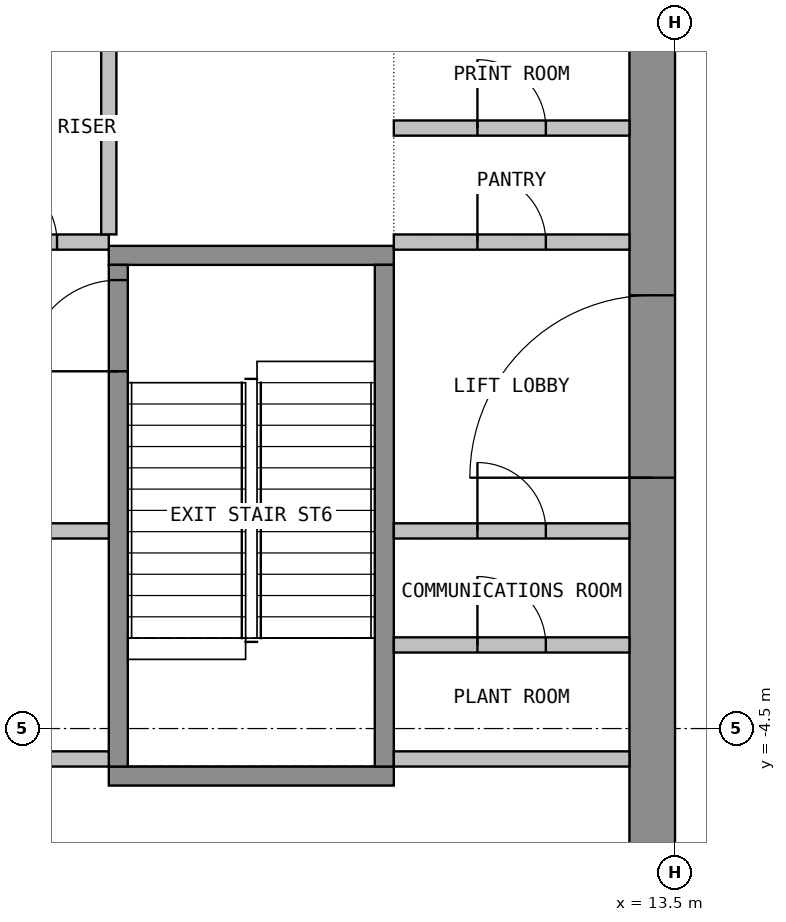
"""IFC4 building model, lengths in metres.
Left out: names, types, materials, properties, quantities, classifications, styles, units other than length and angle.
Written with IfcOpenShell. Run it as: python <this file> out.ifc"""

import sys

from ifc_helpers import new_model, si_unit, direction, frame, frame_2d, origin, place, context, subcontext, project, spatial, rectangle, extrude, element, fill, save


model = new_model("IFC4")
c1 = context("Model", 3, precision=1e-05, world=origin(), true_north=direction((0.0, 1.0)))
c2 = subcontext(c1, "Body", "Model", "MODEL_VIEW")
j1 = project(units=[si_unit("LENGTHUNIT", "METRE"), si_unit("PLANEANGLEUNIT", "RADIAN")], contexts=[c1])
p1 = place(None, origin())
s1 = spatial("IfcSite", under=j1, at=p1, CompositionType="ELEMENT")
p2 = place(p1, origin())
s2 = spatial("IfcBuilding", under=s1, at=p2, CompositionType="ELEMENT")
p3 = place(p2, frame((0.0, 0.0, 318.9)))
s3 = spatial("IfcBuildingStorey", under=s2, at=p3, CompositionType="ELEMENT", Elevation=318.9)
p4 = place(p3, frame((13.2, -10.65, 0.0), z_axis=(0.0, 0.0, 1.0), x_axis=(0.0, 1.0, 0.0)))
e1 = element("IfcWall", 1, at=p4, inside=s3, PredefinedType="SHEAR", context=c2, shape_type="SweptSolid", body=[
    extrude(rectangle(XDim=21.3, YDim=0.6, at=frame_2d((10.65, 0.0))), origin(), (0.0, 0.0, 1.0), 3.6),
])
p5 = place(p4, frame((9.45, 0.0, 0.0)))
e2 = element("IfcOpeningElement", 2, at=p5, cuts=e1, PredefinedType="OPENING", context=c2, shape_type="SweptSolid", body=[
    extrude(rectangle(XDim=2.4, YDim=2.1, at=frame_2d((1.2, 1.05))), frame((0.0, 0.31, 0.0), z_axis=(0.0, -1.0, 0.0), x_axis=(1.0, 0.0, 0.0)), (0.0, 0.0, 1.0), 0.62),
])
for number, where, z_axis, x_axis in (
    (3, (6.05, -5.125, 0.0), (0.0, 0.0, 1.0), (1.0, 0.0, 0.0)),
    (4, (6.05, 1.725, 0.0), (0.0, 0.0, 1.0), (1.0, 0.0, 0.0)),
):
    element("IfcWall", number, at=place(p3, frame(where, z_axis=z_axis, x_axis=x_axis)), inside=s3, PredefinedType="SHEAR", context=c2, shape_type="SweptSolid", body=[
        extrude(rectangle(XDim=3.75, YDim=0.25, at=frame_2d((1.875, 0.0))), origin(), (0.0, 0.0, 1.0), 3.6),
    ])
p6 = place(p3, frame((6.175, -5.0, 0.0), z_axis=(0.0, 0.0, 1.0), x_axis=(0.0, 1.0, 0.0)))
e5 = element("IfcWall", 5, at=p6, inside=s3, PredefinedType="SHEAR", context=c2, shape_type="SweptSolid", body=[
    extrude(rectangle(XDim=6.6, YDim=0.25, at=frame_2d((3.3, 0.0))), origin(), (0.0, 0.0, 1.0), 3.6),
])
p7 = place(p6, frame((5.2, 0.0, 0.0)))
e6 = element("IfcOpeningElement", 6, at=p7, cuts=e5, PredefinedType="OPENING", context=c2, shape_type="SweptSolid", body=[
    extrude(rectangle(XDim=1.2, YDim=2.1, at=frame_2d((0.6, 1.05))), frame((0.0, 0.135, 0.0), z_axis=(0.0, -1.0, 0.0), x_axis=(1.0, 0.0, 0.0)), (0.0, 0.0, 1.0), 0.27),
])
p8 = place(p3, frame((9.675, -5.0, 0.0), z_axis=(0.0, 0.0, 1.0), x_axis=(0.0, 1.0, 0.0)))
e7 = element("IfcWall", 7, at=p8, inside=s3, PredefinedType="SHEAR", context=c2, shape_type="SweptSolid", body=[
    extrude(rectangle(XDim=6.6, YDim=0.25, at=frame_2d((3.3, 0.0))), origin(), (0.0, 0.0, 1.0), 3.6),
])
p9 = place(p3, frame((1.525, 1.9, 0.0), z_axis=(0.0, 0.0, 1.0), x_axis=(1.0, 0.0, 0.0)))
e8 = element("IfcWall", 8, at=p9, inside=s3, PredefinedType="PARTITIONING", context=c2, shape_type="SweptSolid", body=[
    extrude(rectangle(XDim=4.525, YDim=0.2, at=frame_2d((2.263, 0.0))), origin(), (0.0, 0.0, 1.0), 3.6),
])
p10 = place(p9, frame((0.681, 0.0, 0.0)))
e9 = element("IfcOpeningElement", 9, at=p10, cuts=e8, PredefinedType="OPENING", context=c2, shape_type="SweptSolid", body=[
    extrude(rectangle(XDim=0.9, YDim=2.1, at=frame_2d((0.45, 1.05))), frame((0.0, 0.11, 0.0), z_axis=(0.0, -1.0, 0.0), x_axis=(1.0, 0.0, 0.0)), (0.0, 0.0, 1.0), 0.22),
])
p11 = place(p9, frame((2.944, 0.0, 0.0)))
e10 = element("IfcOpeningElement", 10, at=p11, cuts=e8, PredefinedType="OPENING", context=c2, shape_type="SweptSolid", body=[
    extrude(rectangle(XDim=0.9, YDim=2.1, at=frame_2d((0.45, 1.05))), frame((0.0, 0.11, 0.0), z_axis=(0.0, -1.0, 0.0), x_axis=(1.0, 0.0, 0.0)), (0.0, 0.0, 1.0), 0.22),
])
p12 = place(p3, frame((9.8, 3.4, 0.0), z_axis=(0.0, 0.0, 1.0), x_axis=(1.0, 0.0, 0.0)))
e11 = element("IfcWall", 11, at=p12, inside=s3, PredefinedType="PARTITIONING", context=c2, shape_type="SweptSolid", body=[
    extrude(rectangle(XDim=3.1, YDim=0.2, at=frame_2d((1.55, 0.0))), origin(), (0.0, 0.0, 1.0), 3.6),
])
p13 = place(p12, frame((1.1, 0.0, 0.0)))
e12 = element("IfcOpeningElement", 12, at=p13, cuts=e11, PredefinedType="OPENING", context=c2, shape_type="SweptSolid", body=[
    extrude(rectangle(XDim=0.9, YDim=2.1, at=frame_2d((0.45, 1.05))), frame((0.0, 0.11, 0.0), z_axis=(0.0, -1.0, 0.0), x_axis=(1.0, 0.0, 0.0)), (0.0, 0.0, 1.0), 0.22),
])
p14 = place(p3, frame((9.8, 1.9, 0.0), z_axis=(0.0, 0.0, 1.0), x_axis=(1.0, 0.0, 0.0)))
e13 = element("IfcWall", 13, at=p14, inside=s3, PredefinedType="PARTITIONING", context=c2, shape_type="SweptSolid", body=[
    extrude(rectangle(XDim=3.1, YDim=0.2, at=frame_2d((1.55, 0.0))), origin(), (0.0, 0.0, 1.0), 3.6),
])
p15 = place(p14, frame((1.1, 0.0, 0.0)))
e14 = element("IfcOpeningElement", 14, at=p15, cuts=e13, PredefinedType="OPENING", context=c2, shape_type="SweptSolid", body=[
    extrude(rectangle(XDim=0.9, YDim=2.1, at=frame_2d((0.45, 1.05))), frame((0.0, 0.11, 0.0), z_axis=(0.0, -1.0, 0.0), x_axis=(1.0, 0.0, 0.0)), (0.0, 0.0, 1.0), 0.22),
])
p16 = place(p3, frame((1.525, -1.9, 0.0), z_axis=(0.0, 0.0, 1.0), x_axis=(1.0, 0.0, 0.0)))
e15 = element("IfcWall", 15, at=p16, inside=s3, PredefinedType="PARTITIONING", context=c2, shape_type="SweptSolid", body=[
    extrude(rectangle(XDim=4.525, YDim=0.2, at=frame_2d((2.263, 0.0))), origin(), (0.0, 0.0, 1.0), 3.6),
])
p17 = place(p16, frame((1.663, 0.0, 0.0)))
e16 = element("IfcOpeningElement", 16, at=p17, cuts=e15, PredefinedType="OPENING", context=c2, shape_type="SweptSolid", body=[
    extrude(rectangle(XDim=1.2, YDim=2.1, at=frame_2d((0.6, 1.05))), frame((0.0, 0.11, 0.0), z_axis=(0.0, -1.0, 0.0), x_axis=(1.0, 0.0, 0.0)), (0.0, 0.0, 1.0), 0.22),
])
p18 = place(p3, frame((1.525, -4.9, 0.0), z_axis=(0.0, 0.0, 1.0), x_axis=(1.0, 0.0, 0.0)))
e17 = element("IfcWall", 17, at=p18, inside=s3, PredefinedType="PARTITIONING", context=c2, shape_type="SweptSolid", body=[
    extrude(rectangle(XDim=4.525, YDim=0.2, at=frame_2d((2.263, 0.0))), origin(), (0.0, 0.0, 1.0), 3.6),
])
p19 = place(p3, frame((9.8, -3.4, 0.0), z_axis=(0.0, 0.0, 1.0), x_axis=(1.0, 0.0, 0.0)))
e18 = element("IfcWall", 18, at=p19, inside=s3, PredefinedType="PARTITIONING", context=c2, shape_type="SweptSolid", body=[
    extrude(rectangle(XDim=3.1, YDim=0.2, at=frame_2d((1.55, 0.0))), origin(), (0.0, 0.0, 1.0), 3.6),
])
p20 = place(p19, frame((1.1, 0.0, 0.0)))
e19 = element("IfcOpeningElement", 19, at=p20, cuts=e18, PredefinedType="OPENING", context=c2, shape_type="SweptSolid", body=[
    extrude(rectangle(XDim=0.9, YDim=2.1, at=frame_2d((0.45, 1.05))), frame((0.0, 0.11, 0.0), z_axis=(0.0, -1.0, 0.0), x_axis=(1.0, 0.0, 0.0)), (0.0, 0.0, 1.0), 0.22),
])
p21 = place(p3, frame((9.8, -1.9, 0.0), z_axis=(0.0, 0.0, 1.0), x_axis=(1.0, 0.0, 0.0)))
e20 = element("IfcWall", 20, at=p21, inside=s3, PredefinedType="PARTITIONING", context=c2, shape_type="SweptSolid", body=[
    extrude(rectangle(XDim=3.1, YDim=0.2, at=frame_2d((1.55, 0.0))), origin(), (0.0, 0.0, 1.0), 3.6),
])
p22 = place(p21, frame((1.1, 0.0, 0.0)))
e21 = element("IfcOpeningElement", 21, at=p22, cuts=e20, PredefinedType="OPENING", context=c2, shape_type="SweptSolid", body=[
    extrude(rectangle(XDim=0.9, YDim=2.1, at=frame_2d((0.45, 1.05))), frame((0.0, 0.11, 0.0), z_axis=(0.0, -1.0, 0.0), x_axis=(1.0, 0.0, 0.0)), (0.0, 0.0, 1.0), 0.22),
])
p23 = place(p3, frame((9.8, -4.9, 0.0), z_axis=(0.0, 0.0, 1.0), x_axis=(1.0, 0.0, 0.0)))
e22 = element("IfcWall", 22, at=p23, inside=s3, PredefinedType="PARTITIONING", context=c2, shape_type="SweptSolid", body=[
    extrude(rectangle(XDim=3.1, YDim=0.2, at=frame_2d((1.55, 0.0))), origin(), (0.0, 0.0, 1.0), 3.6),
])
p24 = place(p3, frame((6.05, 2.001, 0.0), z_axis=(0.0, 0.0, 1.0), x_axis=(0.0, 1.0, 0.0)))
e23 = element("IfcWall", 23, at=p24, inside=s3, PredefinedType="PARTITIONING", context=c2, shape_type="SweptSolid", body=[
    extrude(rectangle(XDim=2.798, YDim=0.2, at=frame_2d((1.399, 0.0))), origin(), (0.0, 0.0, 1.0), 3.6),
])
p25 = place(p5, origin())
e24 = element("IfcDoor", 24, at=p25, inside=s3, OperationType="DOUBLE_DOOR_DOUBLE_SWING", PredefinedType="DOOR", context=c2, shape_type="SweptSolid", body=[
    extrude(rectangle(XDim=2.4, YDim=2.1, at=frame_2d((1.2, 1.05))), frame((0.0, 0.025, 0.0), z_axis=(0.0, -1.0, 0.0), x_axis=(1.0, 0.0, 0.0)), (0.0, 0.0, 1.0), 0.05),
])
fill(e2, e24)
p26 = place(p7, origin())
e25 = element("IfcDoor", 25, at=p26, inside=s3, OperationType="SINGLE_SWING_LEFT", PredefinedType="DOOR", context=c2, shape_type="SweptSolid", body=[
    extrude(rectangle(XDim=1.2, YDim=2.1, at=frame_2d((0.6, 1.05))), frame((0.0, 0.025, 0.0), z_axis=(0.0, -1.0, 0.0), x_axis=(1.0, 0.0, 0.0)), (0.0, 0.0, 1.0), 0.05),
])
fill(e6, e25)
p27 = place(p11, origin())
e26 = element("IfcDoor", 26, at=p27, inside=s3, OperationType="SINGLE_SWING_LEFT", PredefinedType="DOOR", context=c2, shape_type="SweptSolid", body=[
    extrude(rectangle(XDim=0.9, YDim=2.1, at=frame_2d((0.45, 1.05))), frame((0.0, 0.025, 0.0), z_axis=(0.0, -1.0, 0.0), x_axis=(1.0, 0.0, 0.0)), (0.0, 0.0, 1.0), 0.05),
])
fill(e10, e26)
p28 = place(p13, origin())
e27 = element("IfcDoor", 27, at=p28, inside=s3, OperationType="SINGLE_SWING_LEFT", PredefinedType="DOOR", context=c2, shape_type="SweptSolid", body=[
    extrude(rectangle(XDim=0.9, YDim=2.1, at=frame_2d((0.45, 1.05))), frame((0.0, 0.025, 0.0), z_axis=(0.0, -1.0, 0.0), x_axis=(1.0, 0.0, 0.0)), (0.0, 0.0, 1.0), 0.05),
])
fill(e12, e27)
p29 = place(p15, origin())
e28 = element("IfcDoor", 28, at=p29, inside=s3, OperationType="SINGLE_SWING_LEFT", PredefinedType="DOOR", context=c2, shape_type="SweptSolid", body=[
    extrude(rectangle(XDim=0.9, YDim=2.1, at=frame_2d((0.45, 1.05))), frame((0.0, 0.025, 0.0), z_axis=(0.0, -1.0, 0.0), x_axis=(1.0, 0.0, 0.0)), (0.0, 0.0, 1.0), 0.05),
])
fill(e14, e28)
p30 = place(p20, origin())
e29 = element("IfcDoor", 29, at=p30, inside=s3, OperationType="SINGLE_SWING_LEFT", PredefinedType="DOOR", context=c2, shape_type="SweptSolid", body=[
    extrude(rectangle(XDim=0.9, YDim=2.1, at=frame_2d((0.45, 1.05))), frame((0.0, 0.025, 0.0), z_axis=(0.0, -1.0, 0.0), x_axis=(1.0, 0.0, 0.0)), (0.0, 0.0, 1.0), 0.05),
])
fill(e19, e29)
p31 = place(p22, origin())
e30 = element("IfcDoor", 30, at=p31, inside=s3, OperationType="SINGLE_SWING_LEFT", PredefinedType="DOOR", context=c2, shape_type="SweptSolid", body=[
    extrude(rectangle(XDim=0.9, YDim=2.1, at=frame_2d((0.45, 1.05))), frame((0.0, 0.025, 0.0), z_axis=(0.0, -1.0, 0.0), x_axis=(1.0, 0.0, 0.0)), (0.0, 0.0, 1.0), 0.05),
])
fill(e21, e30)
save(model, sys.argv[1])
